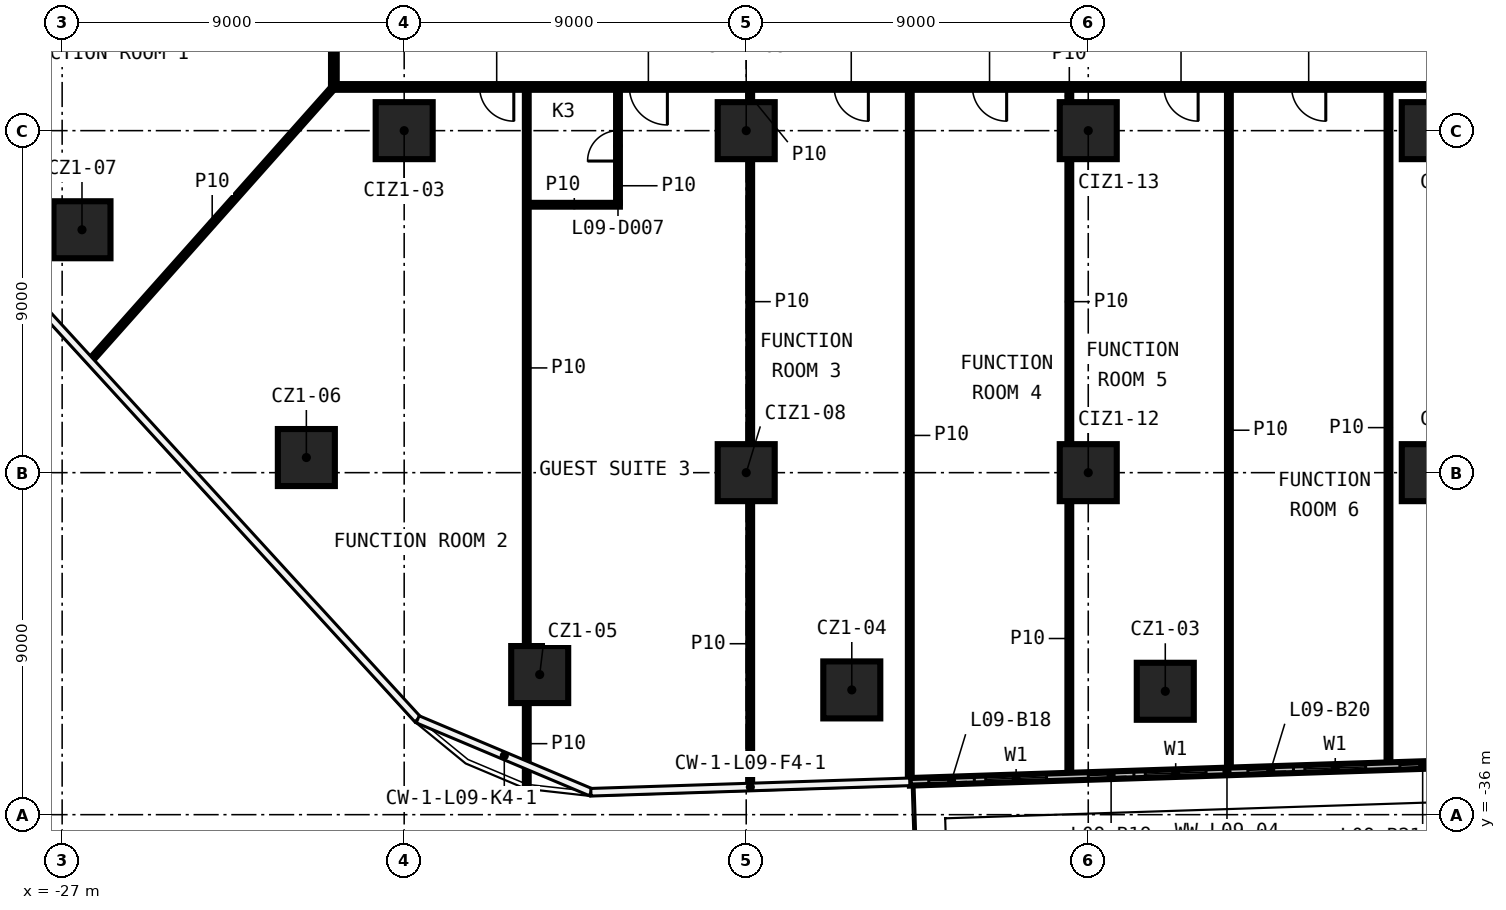
"""IFC4 building model, lengths in metres.
Left out: names, types, materials, properties, quantities, classifications, styles, units other than length and angle.
Written with IfcOpenShell. Run it as: python <this file> out.ifc"""

import sys

from ifc_helpers import new_model, si_unit, direction, frame, frame_2d, origin, origin_2d, place, context, subcontext, project, spatial, rectangle, extrude, element, fill, save


model = new_model("IFC4")
c1 = context("Model", 3, precision=1e-05, world=origin(), true_north=direction((0.0, 1.0)))
c2 = subcontext(c1, "Body", "Model", "MODEL_VIEW")
j1 = project(units=[si_unit("LENGTHUNIT", "METRE"), si_unit("PLANEANGLEUNIT", "RADIAN")], contexts=[c1])
p1 = place(None, origin())
s1 = spatial("IfcSite", under=j1, at=p1, CompositionType="ELEMENT")
p2 = place(p1, origin())
s2 = spatial("IfcBuilding", under=s1, at=p2, CompositionType="ELEMENT")
p3 = place(p2, frame((0.0, 0.0, 55.1)))
s3 = spatial("IfcBuildingStorey", under=s2, at=p3, CompositionType="ELEMENT", Elevation=55.1)
for number, where, z_axis, x_axis in (
    (1, (2.027, -32.753, 0.0), (0.0, 0.0, 1.0), (1.0, 0.0, 0.0)),
    (2, (-6.222, -32.717, 0.0), (0.0, 0.0, 1.0), (1.0, 0.0, 0.0)),
    (3, (-14.434, -32.313, 0.0), (0.0, 0.0, 1.0), (1.0, 0.0, 0.0)),
    (4, (-20.574, -26.602, 0.0), (0.0, 0.0, 1.0), (1.0, 0.0, 0.0)),
    (5, (-26.478, -20.608, 0.0), (0.0, 0.0, 1.0), (1.0, 0.0, 0.0)),
    (6, (-18.0, -18.0, 0.0), (0.0, 0.0, 1.0), (1.0, 0.0, 0.0)),
    (7, (-9.0, -27.0, 0.0), (0.0, 0.0, 1.0), (1.0, 0.0, 0.0)),
    (8, (-9.0, -18.0, 0.0), (0.0, 0.0, 1.0), (1.0, 0.0, 0.0)),
    (9, (0.0, -27.0, 0.0), (0.0, 0.0, 1.0), (1.0, 0.0, 0.0)),
    (10, (0.0, -18.0, 0.0), (0.0, 0.0, 1.0), (1.0, 0.0, 0.0)),
    (11, (9.0, -27.0, 0.0), (0.0, 0.0, 1.0), (1.0, 0.0, 0.0)),
    (12, (9.0, -18.0, 0.0), (0.0, 0.0, 1.0), (1.0, 0.0, 0.0)),
):
    element("IfcColumn", number, at=place(p3, frame(where, z_axis=z_axis, x_axis=x_axis)), inside=s3, PredefinedType="COLUMN", context=c2, shape_type="SweptSolid", body=[
        extrude(rectangle(XDim=1.5, YDim=1.5, at=origin_2d()), origin(), (0.0, 0.0, 1.0), 3.3),
    ])
p4 = place(p3, frame((-14.724, -19.95, 0.0), z_axis=(0.0, 0.0, 1.0), x_axis=(1.0, 0.0, 0.0)))
e13 = element("IfcWall", 13, at=p4, inside=s3, PredefinedType="PARTITIONING", context=c2, shape_type="SweptSolid", body=[
    extrude(rectangle(XDim=2.4, YDim=0.1, at=frame_2d((1.2, 0.0))), origin(), (0.0, 0.0, 1.0), 3.3),
])
p5 = place(p3, frame((19.925, -16.85, 0.0), z_axis=(0.0, 0.0, 1.0), x_axis=(-1.0, 0.0, 0.0)))
e14 = element("IfcWall", 14, at=p5, inside=s3, PredefinedType="PARTITIONING", context=c2, shape_type="SweptSolid", body=[
    extrude(rectangle(XDim=39.85, YDim=0.15, at=frame_2d((19.925, 0.0))), origin(), (0.0, 0.0, 1.0), 3.3),
])
p6 = place(p5, frame((35.041, 0.0, 0.0)))
e15 = element("IfcOpeningElement", 15, at=p6, cuts=e14, PredefinedType="OPENING", context=c2, shape_type="SweptSolid", body=[
    extrude(rectangle(XDim=0.9, YDim=2.1, at=frame_2d((0.45, 1.05))), frame((0.0, 0.085, 0.0), z_axis=(0.0, -1.0, 0.0), x_axis=(1.0, 0.0, 0.0)), (0.0, 0.0, 1.0), 0.17),
])
p7 = place(p5, frame((31.0, 0.0, 0.0)))
e16 = element("IfcOpeningElement", 16, at=p7, cuts=e14, PredefinedType="OPENING", context=c2, shape_type="SweptSolid", body=[
    extrude(rectangle(XDim=1.0, YDim=2.1, at=frame_2d((0.5, 1.05))), frame((0.0, 0.085, 0.0), z_axis=(0.0, -1.0, 0.0), x_axis=(1.0, 0.0, 0.0)), (0.0, 0.0, 1.0), 0.17),
])
p8 = place(p5, frame((25.711, 0.0, 0.0)))
e17 = element("IfcOpeningElement", 17, at=p8, cuts=e14, PredefinedType="OPENING", context=c2, shape_type="SweptSolid", body=[
    extrude(rectangle(XDim=0.9, YDim=2.1, at=frame_2d((0.45, 1.05))), frame((0.0, 0.085, 0.0), z_axis=(0.0, -1.0, 0.0), x_axis=(1.0, 0.0, 0.0)), (0.0, 0.0, 1.0), 0.17),
])
p9 = place(p5, frame((22.072, 0.0, 0.0)))
e18 = element("IfcOpeningElement", 18, at=p9, cuts=e14, PredefinedType="OPENING", context=c2, shape_type="SweptSolid", body=[
    extrude(rectangle(XDim=0.9, YDim=2.1, at=frame_2d((0.45, 1.05))), frame((0.0, 0.085, 0.0), z_axis=(0.0, -1.0, 0.0), x_axis=(1.0, 0.0, 0.0)), (0.0, 0.0, 1.0), 0.17),
])
p10 = place(p5, frame((17.034, 0.0, 0.0)))
e19 = element("IfcOpeningElement", 19, at=p10, cuts=e14, PredefinedType="OPENING", context=c2, shape_type="SweptSolid", body=[
    extrude(rectangle(XDim=0.9, YDim=2.1, at=frame_2d((0.45, 1.05))), frame((0.0, 0.085, 0.0), z_axis=(0.0, -1.0, 0.0), x_axis=(1.0, 0.0, 0.0)), (0.0, 0.0, 1.0), 0.17),
])
p11 = place(p5, frame((13.675, 0.0, 0.0)))
e20 = element("IfcOpeningElement", 20, at=p11, cuts=e14, PredefinedType="OPENING", context=c2, shape_type="SweptSolid", body=[
    extrude(rectangle(XDim=0.9, YDim=2.1, at=frame_2d((0.45, 1.05))), frame((0.0, 0.085, 0.0), z_axis=(0.0, -1.0, 0.0), x_axis=(1.0, 0.0, 0.0)), (0.0, 0.0, 1.0), 0.17),
])
p12 = place(p5, frame((4.031, 0.0, 0.0)))
e21 = element("IfcOpeningElement", 21, at=p12, cuts=e14, PredefinedType="OPENING", context=c2, shape_type="SweptSolid", body=[
    extrude(rectangle(XDim=1.0, YDim=2.1, at=frame_2d((0.5, 1.05))), frame((0.0, 0.085, 0.0), z_axis=(0.0, -1.0, 0.0), x_axis=(1.0, 0.0, 0.0)), (0.0, 0.0, 1.0), 0.17),
])
p13 = place(p3, frame((-26.253, -24.05, 0.0), z_axis=(0.0, 0.0, 1.0), x_axis=(0.66458555916, 0.747212175059, 0.0)))
e22 = element("IfcWall", 22, at=p13, inside=s3, PredefinedType="PARTITIONING", context=c2, shape_type="SweptSolid", body=[
    extrude(rectangle(XDim=9.635, YDim=0.1, at=frame_2d((4.818, 0.0))), origin(), (0.0, 0.0, 1.0), 3.3),
])
p14 = place(p3, frame((7.9, -34.704, 0.0), z_axis=(0.0, 0.0, 1.0), x_axis=(0.0, 1.0, 0.0)))
e23 = element("IfcWall", 23, at=p14, inside=s3, PredefinedType="PARTITIONING", context=c2, shape_type="SweptSolid", body=[
    extrude(rectangle(XDim=17.779, YDim=0.1, at=frame_2d((8.89, 0.0))), origin(), (0.0, 0.0, 1.0), 3.3),
])
p15 = place(p3, frame((3.701, -34.842, 0.0), z_axis=(0.0, 0.0, 1.0), x_axis=(0.0, 1.0, 0.0)))
e24 = element("IfcWall", 24, at=p15, inside=s3, PredefinedType="PARTITIONING", context=c2, shape_type="SweptSolid", body=[
    extrude(rectangle(XDim=17.917, YDim=0.1, at=frame_2d((8.958, 0.0))), origin(), (0.0, 0.0, 1.0), 3.3),
])
p16 = place(p3, frame((-0.498, -34.979, 0.0), z_axis=(0.0, 0.0, 1.0), x_axis=(0.0, 1.0, 0.0)))
e25 = element("IfcWall", 25, at=p16, inside=s3, PredefinedType="PARTITIONING", context=c2, shape_type="SweptSolid", body=[
    extrude(rectangle(XDim=7.229, YDim=0.1, at=frame_2d((3.614, 0.0))), origin(), (0.0, 0.0, 1.0), 3.3),
])
p17 = place(p3, frame((-0.498, -26.25, 0.0), z_axis=(0.0, 0.0, 1.0), x_axis=(0.0, 1.0, 0.0)))
e26 = element("IfcWall", 26, at=p17, inside=s3, PredefinedType="PARTITIONING", context=c2, shape_type="SweptSolid", body=[
    extrude(rectangle(XDim=7.5, YDim=0.1, at=frame_2d((3.75, 0.0))), origin(), (0.0, 0.0, 1.0), 3.3),
])
p18 = place(p3, frame((-0.498, -17.25, 0.0), z_axis=(0.0, 0.0, 1.0), x_axis=(0.0, 1.0, 0.0)))
e27 = element("IfcWall", 27, at=p18, inside=s3, PredefinedType="PARTITIONING", context=c2, shape_type="SweptSolid", body=[
    extrude(rectangle(XDim=0.325, YDim=0.1, at=frame_2d((0.163, 0.0))), origin(), (0.0, 0.0, 1.0), 3.3),
])
p19 = place(p3, frame((-4.696, -35.116, 0.0), z_axis=(0.0, 0.0, 1.0), x_axis=(0.0, 1.0, 0.0)))
e28 = element("IfcWall", 28, at=p19, inside=s3, PredefinedType="PARTITIONING", context=c2, shape_type="SweptSolid", body=[
    extrude(rectangle(XDim=18.191, YDim=0.1, at=frame_2d((9.095, 0.0))), origin(), (0.0, 0.0, 1.0), 3.3),
])
p20 = place(p3, frame((-8.895, -35.253, 0.0), z_axis=(0.0, 0.0, 1.0), x_axis=(0.0, 1.0, 0.0)))
e29 = element("IfcWall", 29, at=p20, inside=s3, PredefinedType="PARTITIONING", context=c2, shape_type="SweptSolid", body=[
    extrude(rectangle(XDim=7.503, YDim=0.1, at=frame_2d((3.751, 0.0))), origin(), (0.0, 0.0, 1.0), 3.3),
])
p21 = place(p3, frame((-8.895, -26.25, 0.0), z_axis=(0.0, 0.0, 1.0), x_axis=(0.0, 1.0, 0.0)))
e30 = element("IfcWall", 30, at=p21, inside=s3, PredefinedType="PARTITIONING", context=c2, shape_type="SweptSolid", body=[
    extrude(rectangle(XDim=7.5, YDim=0.1, at=frame_2d((3.75, 0.0))), origin(), (0.0, 0.0, 1.0), 3.3),
])
p22 = place(p3, frame((-8.895, -17.25, 0.0), z_axis=(0.0, 0.0, 1.0), x_axis=(0.0, 1.0, 0.0)))
e31 = element("IfcWall", 31, at=p22, inside=s3, PredefinedType="PARTITIONING", context=c2, shape_type="SweptSolid", body=[
    extrude(rectangle(XDim=0.325, YDim=0.1, at=frame_2d((0.163, 0.0))), origin(), (0.0, 0.0, 1.0), 3.3),
])
p23 = place(p3, frame((-12.374, -19.9, 0.0), z_axis=(0.0, 0.0, 1.0), x_axis=(0.0, 1.0, 0.0)))
e32 = element("IfcWall", 32, at=p23, inside=s3, PredefinedType="PARTITIONING", context=c2, shape_type="SweptSolid", body=[
    extrude(rectangle(XDim=2.975, YDim=0.1, at=frame_2d((1.487, 0.0))), origin(), (0.0, 0.0, 1.0), 3.3),
])
p24 = place(p23, frame((1.1, 0.0, 0.0)))
e33 = element("IfcOpeningElement", 33, at=p24, cuts=e32, PredefinedType="OPENING", context=c2, shape_type="SweptSolid", body=[
    extrude(rectangle(XDim=0.8, YDim=2.1, at=frame_2d((0.4, 1.05))), frame((0.0, 0.06, 0.0), z_axis=(0.0, -1.0, 0.0), x_axis=(1.0, 0.0, 0.0)), (0.0, 0.0, 1.0), 0.12),
])
p25 = place(p3, frame((-14.774, -35.2, 0.0), z_axis=(0.0, 0.0, 1.0), x_axis=(0.0, 1.0, 0.0)))
e34 = element("IfcWall", 34, at=p25, inside=s3, PredefinedType="PARTITIONING", context=c2, shape_type="SweptSolid", body=[
    extrude(rectangle(XDim=2.137, YDim=0.1, at=frame_2d((1.068, 0.0))), origin(), (0.0, 0.0, 1.0), 3.3),
])
p26 = place(p3, frame((-14.774, -31.563, 0.0), z_axis=(0.0, 0.0, 1.0), x_axis=(0.0, 1.0, 0.0)))
e35 = element("IfcWall", 35, at=p26, inside=s3, PredefinedType="PARTITIONING", context=c2, shape_type="SweptSolid", body=[
    extrude(rectangle(XDim=14.638, YDim=0.1, at=frame_2d((7.319, 0.0))), origin(), (0.0, 0.0, 1.0), 3.3),
])
p27 = place(p3, frame((-19.85, -16.775, 0.0), z_axis=(0.0, 0.0, 1.0), x_axis=(0.0, 1.0, 0.0)))
e36 = element("IfcWall", 36, at=p27, inside=s3, PredefinedType="PARTITIONING", context=c2, shape_type="SweptSolid", body=[
    extrude(rectangle(XDim=33.55, YDim=0.15, at=frame_2d((16.775, 0.0))), origin(), (0.0, 0.0, 1.0), 3.3),
])
p28 = place(p27, frame((12.083, 0.0, 0.0)))
e37 = element("IfcOpeningElement", 37, at=p28, cuts=e36, PredefinedType="OPENING", context=c2, shape_type="SweptSolid", body=[
    extrude(rectangle(XDim=1.0, YDim=2.1, at=frame_2d((0.5, 1.05))), frame((0.0, 0.085, 0.0), z_axis=(0.0, -1.0, 0.0), x_axis=(1.0, 0.0, 0.0)), (0.0, 0.0, 1.0), 0.17),
])
p29 = place(p27, frame((10.128, 0.0, 0.0)))
e38 = element("IfcOpeningElement", 38, at=p29, cuts=e36, PredefinedType="OPENING", context=c2, shape_type="SweptSolid", body=[
    extrude(rectangle(XDim=1.0, YDim=2.1, at=frame_2d((0.5, 1.05))), frame((0.0, 0.085, 0.0), z_axis=(0.0, -1.0, 0.0), x_axis=(1.0, 0.0, 0.0)), (0.0, 0.0, 1.0), 0.17),
])
p30 = place(p27, frame((3.259, 0.0, 0.0)))
e39 = element("IfcOpeningElement", 39, at=p30, cuts=e36, PredefinedType="OPENING", context=c2, shape_type="SweptSolid", body=[
    extrude(rectangle(XDim=0.9, YDim=2.1, at=frame_2d((0.45, 1.05))), frame((0.0, 0.085, 0.0), z_axis=(0.0, -1.0, 0.0), x_axis=(1.0, 0.0, 0.0)), (0.0, 0.0, 1.0), 0.17),
])
p31 = place(p27, frame((30.799, 0.0, 0.0)))
e40 = element("IfcOpeningElement", 40, at=p31, cuts=e36, PredefinedType="OPENING", context=c2, shape_type="SweptSolid", body=[
    extrude(rectangle(XDim=1.0, YDim=2.1, at=frame_2d((0.5, 1.05))), frame((0.0, 0.085, 0.0), z_axis=(0.0, -1.0, 0.0), x_axis=(1.0, 0.0, 0.0)), (0.0, 0.0, 1.0), 0.17),
])
p32 = place(p27, frame((22.638, 0.0, 0.0)))
e41 = element("IfcOpeningElement", 41, at=p32, cuts=e36, PredefinedType="OPENING", context=c2, shape_type="SweptSolid", body=[
    extrude(rectangle(XDim=1.0, YDim=2.1, at=frame_2d((0.5, 1.05))), frame((0.0, 0.085, 0.0), z_axis=(0.0, -1.0, 0.0), x_axis=(1.0, 0.0, 0.0)), (0.0, 0.0, 1.0), 0.17),
])
p33 = place(p27, frame((18.681, 0.0, 0.0)))
e42 = element("IfcOpeningElement", 42, at=p33, cuts=e36, PredefinedType="OPENING", context=c2, shape_type="SweptSolid", body=[
    extrude(rectangle(XDim=0.9, YDim=2.1, at=frame_2d((0.45, 1.05))), frame((0.0, 0.085, 0.0), z_axis=(0.0, -1.0, 0.0), x_axis=(1.0, 0.0, 0.0)), (0.0, 0.0, 1.0), 0.17),
])
p34 = place(p3, frame((-4.697, -35.136, 0.0), z_axis=(0.0, 0.0, 1.0), x_axis=(0.999466983916, 0.032645796998, 0.0)))
e43 = element("IfcWall", 43, at=p34, inside=s3, PredefinedType="SOLIDWALL", context=c2, shape_type="SweptSolid", body=[
    extrude(rectangle(XDim=16.804, YDim=0.2, at=frame_2d((8.402, 0.0))), origin(), (0.0, 0.0, 1.0), 3.3),
])
p35 = place(p34, frame((2.0, 0.0, 0.6)))
e44 = element("IfcOpeningElement", 44, at=p35, cuts=e43, PredefinedType="OPENING", context=c2, shape_type="SweptSolid", body=[
    extrude(rectangle(XDim=1.6, YDim=2.4, at=frame_2d((0.8, 1.2))), frame((0.0, 0.11, 0.0), z_axis=(0.0, -1.0, 0.0), x_axis=(1.0, 0.0, 0.0)), (0.0, 0.0, 1.0), 0.22),
])
p36 = place(p34, frame((0.5, 0.0, 0.0)))
e45 = element("IfcOpeningElement", 45, at=p36, cuts=e43, PredefinedType="OPENING", context=c2, shape_type="SweptSolid", body=[
    extrude(rectangle(XDim=1.2, YDim=2.4, at=frame_2d((0.6, 1.2))), frame((0.0, 0.11, 0.0), z_axis=(0.0, -1.0, 0.0), x_axis=(1.0, 0.0, 0.0)), (0.0, 0.0, 1.0), 0.22),
])
p37 = place(p34, frame((6.201, 0.0, 0.6)))
e46 = element("IfcOpeningElement", 46, at=p37, cuts=e43, PredefinedType="OPENING", context=c2, shape_type="SweptSolid", body=[
    extrude(rectangle(XDim=1.6, YDim=2.4, at=frame_2d((0.8, 1.2))), frame((0.0, 0.11, 0.0), z_axis=(0.0, -1.0, 0.0), x_axis=(1.0, 0.0, 0.0)), (0.0, 0.0, 1.0), 0.22),
])
p38 = place(p34, frame((4.701, 0.0, 0.0)))
e47 = element("IfcOpeningElement", 47, at=p38, cuts=e43, PredefinedType="OPENING", context=c2, shape_type="SweptSolid", body=[
    extrude(rectangle(XDim=1.2, YDim=2.4, at=frame_2d((0.6, 1.2))), frame((0.0, 0.11, 0.0), z_axis=(0.0, -1.0, 0.0), x_axis=(1.0, 0.0, 0.0)), (0.0, 0.0, 1.0), 0.22),
])
p39 = place(p34, frame((10.402, 0.0, 0.6)))
e48 = element("IfcOpeningElement", 48, at=p39, cuts=e43, PredefinedType="OPENING", context=c2, shape_type="SweptSolid", body=[
    extrude(rectangle(XDim=1.6, YDim=2.4, at=frame_2d((0.8, 1.2))), frame((0.0, 0.11, 0.0), z_axis=(0.0, -1.0, 0.0), x_axis=(1.0, 0.0, 0.0)), (0.0, 0.0, 1.0), 0.22),
])
p40 = place(p34, frame((8.902, 0.0, 0.0)))
e49 = element("IfcOpeningElement", 49, at=p40, cuts=e43, PredefinedType="OPENING", context=c2, shape_type="SweptSolid", body=[
    extrude(rectangle(XDim=1.2, YDim=2.4, at=frame_2d((0.6, 1.2))), frame((0.0, 0.11, 0.0), z_axis=(0.0, -1.0, 0.0), x_axis=(1.0, 0.0, 0.0)), (0.0, 0.0, 1.0), 0.22),
])
p41 = place(p34, frame((14.603, 0.0, 0.6)))
e50 = element("IfcOpeningElement", 50, at=p41, cuts=e43, PredefinedType="OPENING", context=c2, shape_type="SweptSolid", body=[
    extrude(rectangle(XDim=1.6, YDim=2.4, at=frame_2d((0.8, 1.2))), frame((0.0, 0.11, 0.0), z_axis=(0.0, -1.0, 0.0), x_axis=(1.0, 0.0, 0.0)), (0.0, 0.0, 1.0), 0.22),
])
p42 = place(p34, frame((12.903, 0.0, 0.0)))
e51 = element("IfcOpeningElement", 51, at=p42, cuts=e43, PredefinedType="OPENING", context=c2, shape_type="SweptSolid", body=[
    extrude(rectangle(XDim=1.2, YDim=2.4, at=frame_2d((0.6, 1.2))), frame((0.0, 0.11, 0.0), z_axis=(0.0, -1.0, 0.0), x_axis=(1.0, 0.0, 0.0)), (0.0, 0.0, 1.0), 0.22),
])
p43 = place(p6, origin())
e52 = element("IfcDoor", 52, at=p43, inside=s3, OperationType="SINGLE_SWING_LEFT", PredefinedType="DOOR", context=c2, shape_type="SweptSolid", body=[
    extrude(rectangle(XDim=0.9, YDim=2.1, at=frame_2d((0.45, 1.05))), frame((0.0, 0.025, 0.0), z_axis=(0.0, -1.0, 0.0), x_axis=(1.0, 0.0, 0.0)), (0.0, 0.0, 1.0), 0.05),
])
fill(e15, e52)
p44 = place(p24, origin())
e53 = element("IfcDoor", 53, at=p44, inside=s3, OperationType="SINGLE_SWING_LEFT", PredefinedType="DOOR", context=c2, shape_type="SweptSolid", body=[
    extrude(rectangle(XDim=0.8, YDim=2.1, at=frame_2d((0.4, 1.05))), frame((0.0, 0.025, 0.0), z_axis=(0.0, -1.0, 0.0), x_axis=(1.0, 0.0, 0.0)), (0.0, 0.0, 1.0), 0.05),
])
fill(e33, e53)
p45 = place(p7, origin())
e54 = element("IfcDoor", 54, at=p45, inside=s3, OperationType="SINGLE_SWING_RIGHT", PredefinedType="DOOR", context=c2, shape_type="SweptSolid", body=[
    extrude(rectangle(XDim=1.0, YDim=2.1, at=frame_2d((0.5, 1.05))), frame((0.0, 0.025, 0.0), z_axis=(0.0, -1.0, 0.0), x_axis=(1.0, 0.0, 0.0)), (0.0, 0.0, 1.0), 0.05),
])
fill(e16, e54)
p46 = place(p8, origin())
e55 = element("IfcDoor", 55, at=p46, inside=s3, OperationType="SINGLE_SWING_LEFT", PredefinedType="DOOR", context=c2, shape_type="SweptSolid", body=[
    extrude(rectangle(XDim=0.9, YDim=2.1, at=frame_2d((0.45, 1.05))), frame((0.0, 0.025, 0.0), z_axis=(0.0, -1.0, 0.0), x_axis=(1.0, 0.0, 0.0)), (0.0, 0.0, 1.0), 0.05),
])
fill(e17, e55)
p47 = place(p9, origin())
e56 = element("IfcDoor", 56, at=p47, inside=s3, OperationType="SINGLE_SWING_RIGHT", PredefinedType="DOOR", context=c2, shape_type="SweptSolid", body=[
    extrude(rectangle(XDim=0.9, YDim=2.1, at=frame_2d((0.45, 1.05))), frame((0.0, 0.025, 0.0), z_axis=(0.0, -1.0, 0.0), x_axis=(1.0, 0.0, 0.0)), (0.0, 0.0, 1.0), 0.05),
])
fill(e18, e56)
p48 = place(p10, origin())
e57 = element("IfcDoor", 57, at=p48, inside=s3, OperationType="SINGLE_SWING_LEFT", PredefinedType="DOOR", context=c2, shape_type="SweptSolid", body=[
    extrude(rectangle(XDim=0.9, YDim=2.1, at=frame_2d((0.45, 1.05))), frame((0.0, 0.025, 0.0), z_axis=(0.0, -1.0, 0.0), x_axis=(1.0, 0.0, 0.0)), (0.0, 0.0, 1.0), 0.05),
])
fill(e19, e57)
p49 = place(p11, origin())
e58 = element("IfcDoor", 58, at=p49, inside=s3, OperationType="SINGLE_SWING_RIGHT", PredefinedType="DOOR", context=c2, shape_type="SweptSolid", body=[
    extrude(rectangle(XDim=0.9, YDim=2.1, at=frame_2d((0.45, 1.05))), frame((0.0, 0.025, 0.0), z_axis=(0.0, -1.0, 0.0), x_axis=(1.0, 0.0, 0.0)), (0.0, 0.0, 1.0), 0.05),
])
fill(e20, e58)
p50 = place(p35, origin())
e59 = element("IfcWindow", 59, at=p50, inside=s3, PartitioningType="SINGLE_PANEL", PredefinedType="WINDOW", context=c2, shape_type="SweptSolid", body=[
    extrude(rectangle(XDim=1.6, YDim=2.4, at=frame_2d((0.8, 1.2))), frame((0.0, 0.03, 0.0), z_axis=(0.0, -1.0, 0.0), x_axis=(1.0, 0.0, 0.0)), (0.0, 0.0, 1.0), 0.06),
])
fill(e44, e59)
p51 = place(p36, origin())
e60 = element("IfcDoor", 60, at=p51, inside=s3, OperationType="SLIDING_TO_LEFT", PredefinedType="DOOR", context=c2, shape_type="SweptSolid", body=[
    extrude(rectangle(XDim=1.2, YDim=2.4, at=frame_2d((0.6, 1.2))), frame((0.0, 0.025, 0.0), z_axis=(0.0, -1.0, 0.0), x_axis=(1.0, 0.0, 0.0)), (0.0, 0.0, 1.0), 0.05),
])
fill(e45, e60)
p52 = place(p37, origin())
e61 = element("IfcWindow", 61, at=p52, inside=s3, PartitioningType="SINGLE_PANEL", PredefinedType="WINDOW", context=c2, shape_type="SweptSolid", body=[
    extrude(rectangle(XDim=1.6, YDim=2.4, at=frame_2d((0.8, 1.2))), frame((0.0, 0.03, 0.0), z_axis=(0.0, -1.0, 0.0), x_axis=(1.0, 0.0, 0.0)), (0.0, 0.0, 1.0), 0.06),
])
fill(e46, e61)
p53 = place(p38, origin())
e62 = element("IfcDoor", 62, at=p53, inside=s3, OperationType="SLIDING_TO_LEFT", PredefinedType="DOOR", context=c2, shape_type="SweptSolid", body=[
    extrude(rectangle(XDim=1.2, YDim=2.4, at=frame_2d((0.6, 1.2))), frame((0.0, 0.025, 0.0), z_axis=(0.0, -1.0, 0.0), x_axis=(1.0, 0.0, 0.0)), (0.0, 0.0, 1.0), 0.05),
])
fill(e47, e62)
p54 = place(p39, origin())
e63 = element("IfcWindow", 63, at=p54, inside=s3, PartitioningType="SINGLE_PANEL", PredefinedType="WINDOW", context=c2, shape_type="SweptSolid", body=[
    extrude(rectangle(XDim=1.6, YDim=2.4, at=frame_2d((0.8, 1.2))), frame((0.0, 0.03, 0.0), z_axis=(0.0, -1.0, 0.0), x_axis=(1.0, 0.0, 0.0)), (0.0, 0.0, 1.0), 0.06),
])
fill(e48, e63)
p55 = place(p40, origin())
e64 = element("IfcDoor", 64, at=p55, inside=s3, OperationType="SLIDING_TO_LEFT", PredefinedType="DOOR", context=c2, shape_type="SweptSolid", body=[
    extrude(rectangle(XDim=1.2, YDim=2.4, at=frame_2d((0.6, 1.2))), frame((0.0, 0.025, 0.0), z_axis=(0.0, -1.0, 0.0), x_axis=(1.0, 0.0, 0.0)), (0.0, 0.0, 1.0), 0.05),
])
fill(e49, e64)
p56 = place(p42, origin())
e65 = element("IfcDoor", 65, at=p56, inside=s3, OperationType="SLIDING_TO_LEFT", PredefinedType="DOOR", context=c2, shape_type="SweptSolid", body=[
    extrude(rectangle(XDim=1.2, YDim=2.4, at=frame_2d((0.6, 1.2))), frame((0.0, 0.025, 0.0), z_axis=(0.0, -1.0, 0.0), x_axis=(1.0, 0.0, 0.0)), (0.0, 0.0, 1.0), 0.05),
])
fill(e51, e65)
save(model, sys.argv[1])
